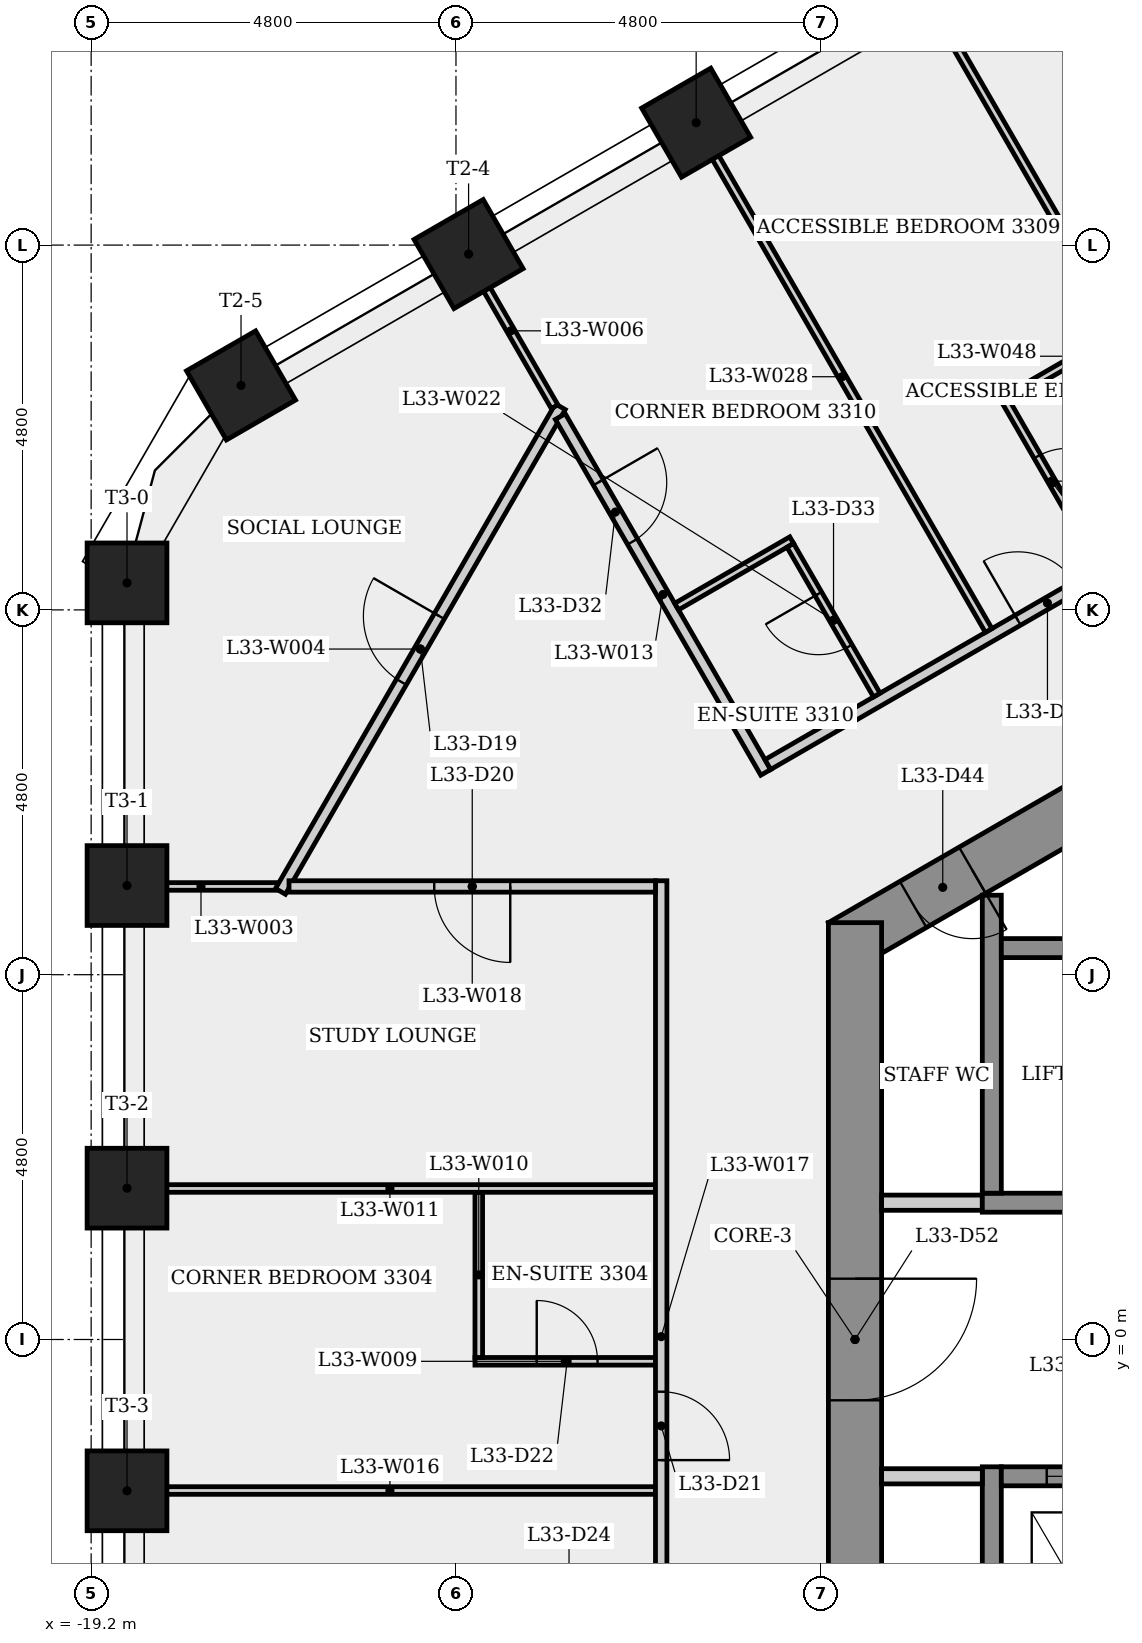
"""IFC4 building model, lengths in metres.
Left out: names, types, materials, properties, quantities, classifications, styles, units other than length and angle.
Written with IfcOpenShell. Run it as: python <this file> out.ifc"""

import sys

from ifc_helpers import new_model, si_unit, direction, frame, frame_2d, origin, origin_2d, place, context, subcontext, project, spatial, rectangle, extrude, element, fill, save


model = new_model("IFC4")
c1 = context("Model", 3, precision=1e-05, world=origin(), true_north=direction((0.0, 1.0)))
c2 = subcontext(c1, "Body", "Model", "MODEL_VIEW")
j1 = project(units=[si_unit("LENGTHUNIT", "METRE"), si_unit("PLANEANGLEUNIT", "RADIAN")], contexts=[c1])
p1 = place(None, origin())
s1 = spatial("IfcSite", under=j1, at=p1, CompositionType="ELEMENT")
p2 = place(p1, origin())
s2 = spatial("IfcBuilding", under=s1, at=p2, CompositionType="ELEMENT")
p3 = place(p2, frame((0.0, 0.0, 124.5)))
s3 = spatial("IfcBuildingStorey", under=s2, at=p3, CompositionType="ELEMENT", Elevation=124.5)
p4 = place(p3, frame((0.175, 10.667, 0.0), z_axis=(0.0, 0.0, 1.0), x_axis=(-0.866023993627, -0.500002442456, 0.0)))
e1 = element("IfcWall", 1, at=p4, inside=s3, PredefinedType="SHEAR", context=c2, shape_type="SweptSolid", body=[
    extrude(rectangle(XDim=10.97, YDim=0.7, at=frame_2d((5.485, 0.0))), origin(), (0.0, 0.0, 1.0), 4.0),
])
p5 = place(p4, frame((8.985, 0.0, 0.0)))
e2 = element("IfcOpeningElement", 2, at=p5, cuts=e1, PredefinedType="OPENING", context=c2, shape_type="SweptSolid", body=[
    extrude(rectangle(XDim=0.9, YDim=2.1, at=frame_2d((0.45, 1.05))), frame((0.0, 0.36, 0.0), z_axis=(0.0, -1.0, 0.0), x_axis=(1.0, 0.0, 0.0)), (0.0, 0.0, 1.0), 0.72),
])
p6 = place(p4, frame((2.495, 0.0, 0.0)))
e3 = element("IfcOpeningElement", 3, at=p6, cuts=e1, PredefinedType="OPENING", context=c2, shape_type="SweptSolid", body=[
    extrude(rectangle(XDim=0.9, YDim=2.1, at=frame_2d((0.45, 1.05))), frame((0.0, 0.36, 0.0), z_axis=(0.0, -1.0, 0.0), x_axis=(1.0, 0.0, 0.0)), (0.0, 0.0, 1.0), 0.72),
])
p7 = place(p3, frame((-9.15, 5.485, 0.0), z_axis=(0.0, 0.0, 1.0), x_axis=(0.0, -1.0, 0.0)))
e4 = element("IfcWall", 4, at=p7, inside=s3, PredefinedType="SHEAR", context=c2, shape_type="SweptSolid", body=[
    extrude(rectangle(XDim=10.97, YDim=0.7, at=frame_2d((5.485, 0.0))), origin(), (0.0, 0.0, 1.0), 4.0),
])
p8 = place(p7, frame((4.685, 0.0, 0.0)))
e5 = element("IfcOpeningElement", 5, at=p8, cuts=e4, PredefinedType="OPENING", context=c2, shape_type="SweptSolid", body=[
    extrude(rectangle(XDim=1.6, YDim=2.1, at=frame_2d((0.8, 1.05))), frame((0.0, 0.36, 0.0), z_axis=(0.0, -1.0, 0.0), x_axis=(1.0, 0.0, 0.0)), (0.0, 0.0, 1.0), 0.72),
])
for number, where, z_axis, x_axis in (
    (6, (-11.24, 16.011, 0.0), (0.0, 0.0, 1.0), (-0.5, 0.866, 0.0)),
    (7, (-14.234, 14.282, 0.0), (0.0, 0.0, 1.0), (-0.5, 0.866, 0.0)),
    (8, (-17.228, 12.553, 0.0), (0.0, 0.0, 1.0), (-0.5, 0.866, 0.0)),
    (9, (-18.728, 9.955, 0.0), (0.0, 0.0, 1.0), (-1.0, 0.0, 0.0)),
    (10, (-18.728, 5.973, 0.0), (0.0, 0.0, 1.0), (-1.0, 0.0, 0.0)),
    (11, (-18.728, 1.991, 0.0), (0.0, 0.0, 1.0), (-1.0, 0.0, 0.0)),
    (12, (-18.728, -1.991, 0.0), (0.0, 0.0, 1.0), (-1.0, 0.0, 0.0)),
):
    element("IfcColumn", number, at=place(p3, frame(where, z_axis=z_axis, x_axis=x_axis)), inside=s3, PredefinedType="COLUMN", context=c2, shape_type="SweptSolid", body=[
        extrude(rectangle(XDim=1.05, YDim=1.05, at=origin_2d()), origin(), (0.0, 0.0, 1.0), 4.0),
    ])
p9 = place(p3, frame((-16.747, 5.961, 0.0), z_axis=(0.0, 0.0, 1.0), x_axis=(-1.0, 0.0, 0.0)))
e13 = element("IfcWall", 13, at=p9, inside=s3, PredefinedType="PARTITIONING", context=c2, shape_type="SweptSolid", body=[
    extrude(rectangle(XDim=2.016, YDim=0.1, at=frame_2d((1.008, 0.0))), origin(), (0.0, 0.0, 1.0), 3.6),
])
p10 = place(p3, frame((-16.709, 5.896, 0.0), z_axis=(0.0, 0.0, 1.0), x_axis=(0.500011344903, 0.866018853703, 0.0)))
e14 = element("IfcWall", 14, at=p10, inside=s3, PredefinedType="PARTITIONING", context=c2, shape_type="SweptSolid", body=[
    extrude(rectangle(XDim=7.364, YDim=0.15, at=frame_2d((3.682, 0.0))), origin(), (0.0, 0.0, 1.0), 3.6),
])
p11 = place(p10, frame((3.182, 0.0, 0.0)))
e15 = element("IfcOpeningElement", 15, at=p11, cuts=e14, PredefinedType="OPENING", context=c2, shape_type="SweptSolid", body=[
    extrude(rectangle(XDim=1.0, YDim=2.1, at=frame_2d((0.5, 1.05))), frame((0.0, 0.085, 0.0), z_axis=(0.0, -1.0, 0.0), x_axis=(1.0, 0.0, 0.0)), (0.0, 0.0, 1.0), 0.17),
])
p12 = place(p3, frame((-14.255, 14.27, 0.0), z_axis=(0.0, 0.0, 1.0), x_axis=(0.499954687168, -0.86605156358, 0.0)))
e16 = element("IfcWall", 16, at=p12, inside=s3, PredefinedType="PARTITIONING", context=c2, shape_type="SweptSolid", body=[
    extrude(rectangle(XDim=2.305, YDim=0.1, at=frame_2d((1.153, 0.0))), origin(), (0.0, 0.0, 1.0), 3.6),
])
p13 = place(p3, frame((-14.15, -0.287, 0.0), z_axis=(0.0, 0.0, 1.0), x_axis=(1.0, 0.0, 0.0)))
e17 = element("IfcWall", 17, at=p13, inside=s3, PredefinedType="PARTITIONING", context=c2, shape_type="SweptSolid", body=[
    extrude(rectangle(XDim=2.375, YDim=0.1, at=frame_2d((1.188, 0.0))), origin(), (0.0, 0.0, 1.0), 3.6),
])
p14 = place(p13, frame((0.812, 0.0, 0.0)))
e18 = element("IfcOpeningElement", 18, at=p14, cuts=e17, PredefinedType="OPENING", context=c2, shape_type="SweptSolid", body=[
    extrude(rectangle(XDim=0.8, YDim=2.1, at=frame_2d((0.4, 1.05))), frame((0.0, 0.06, 0.0), z_axis=(0.0, -1.0, 0.0), x_axis=(1.0, 0.0, 0.0)), (0.0, 0.0, 1.0), 0.12),
])
p15 = place(p3, frame((-14.1, 1.937, 0.0), z_axis=(0.0, 0.0, 1.0), x_axis=(0.0, -1.0, 0.0)))
e19 = element("IfcWall", 19, at=p15, inside=s3, PredefinedType="PARTITIONING", context=c2, shape_type="SweptSolid", body=[
    extrude(rectangle(XDim=2.174, YDim=0.1, at=frame_2d((1.087, 0.0))), origin(), (0.0, 0.0, 1.0), 3.6),
])
p16 = place(p3, frame((-18.763, 1.987, 0.0), z_axis=(0.0, 0.0, 1.0), x_axis=(1.0, 0.0, 0.0)))
e20 = element("IfcWall", 20, at=p16, inside=s3, PredefinedType="PARTITIONING", context=c2, shape_type="SweptSolid", body=[
    extrude(rectangle(XDim=6.988, YDim=0.1, at=frame_2d((3.494, 0.0))), origin(), (0.0, 0.0, 1.0), 3.6),
])
p17 = place(p3, frame((-13.027, 12.144, 0.0), z_axis=(0.0, 0.0, 1.0), x_axis=(0.499962259756, -0.866047192028, 0.0)))
e21 = element("IfcWall", 21, at=p17, inside=s3, PredefinedType="PARTITIONING", context=c2, shape_type="SweptSolid", body=[
    extrude(rectangle(XDim=5.405, YDim=0.15, at=frame_2d((2.703, 0.0))), origin(), (0.0, 0.0, 1.0), 3.6),
])
p18 = place(p17, frame((1.0, 0.0, 0.0)))
e22 = element("IfcOpeningElement", 22, at=p18, cuts=e21, PredefinedType="OPENING", context=c2, shape_type="SweptSolid", body=[
    extrude(rectangle(XDim=0.9, YDim=2.1, at=frame_2d((0.45, 1.05))), frame((0.0, 0.085, 0.0), z_axis=(0.0, -1.0, 0.0), x_axis=(1.0, 0.0, 0.0)), (0.0, 0.0, 1.0), 0.17),
])
p19 = place(p3, frame((-11.775, -1.987, 0.0), z_axis=(0.0, 0.0, 1.0), x_axis=(-1.0, 0.0, 0.0)))
e23 = element("IfcWall", 23, at=p19, inside=s3, PredefinedType="PARTITIONING", context=c2, shape_type="SweptSolid", body=[
    extrude(rectangle(XDim=6.988, YDim=0.1, at=frame_2d((3.494, 0.0))), origin(), (0.0, 0.0, 1.0), 3.6),
])
p20 = place(p3, frame((-11.7, 6.036, 0.0), z_axis=(0.0, 0.0, 1.0), x_axis=(0.0, -1.0, 0.0)))
e24 = element("IfcWall", 24, at=p20, inside=s3, PredefinedType="PARTITIONING", context=c2, shape_type="SweptSolid", body=[
    extrude(rectangle(XDim=11.997, YDim=0.15, at=frame_2d((5.999, 0.0))), origin(), (0.0, 0.0, 1.0), 3.6),
])
p21 = place(p20, frame((6.723, 0.0, 0.0)))
e25 = element("IfcOpeningElement", 25, at=p21, cuts=e24, PredefinedType="OPENING", context=c2, shape_type="SweptSolid", body=[
    extrude(rectangle(XDim=0.9, YDim=2.1, at=frame_2d((0.45, 1.05))), frame((0.0, 0.085, 0.0), z_axis=(0.0, -1.0, 0.0), x_axis=(1.0, 0.0, 0.0)), (0.0, 0.0, 1.0), 0.17),
])
p22 = place(p3, frame((-11.775, 5.961, 0.0), z_axis=(0.0, 0.0, 1.0), x_axis=(-1.0, 0.0, 0.0)))
e26 = element("IfcWall", 26, at=p22, inside=s3, PredefinedType="PARTITIONING", context=c2, shape_type="SweptSolid", body=[
    extrude(rectangle(XDim=4.822, YDim=0.15, at=frame_2d((2.411, 0.0))), origin(), (0.0, 0.0, 1.0), 3.6),
])
p23 = place(p22, frame((1.911, 0.0, 0.0)))
e27 = element("IfcOpeningElement", 27, at=p23, cuts=e26, PredefinedType="OPENING", context=c2, shape_type="SweptSolid", body=[
    extrude(rectangle(XDim=1.0, YDim=2.1, at=frame_2d((0.5, 1.05))), frame((0.0, 0.085, 0.0), z_axis=(0.0, -1.0, 0.0), x_axis=(1.0, 0.0, 0.0)), (0.0, 0.0, 1.0), 0.17),
])
p24 = place(p3, frame((-10.297, 7.565, 0.0), z_axis=(0.0, 0.0, 1.0), x_axis=(0.866021325373, 0.50000706395, 0.0)))
e28 = element("IfcWall", 28, at=p24, inside=s3, PredefinedType="PARTITIONING", context=c2, shape_type="SweptSolid", body=[
    extrude(rectangle(XDim=10.42, YDim=0.15, at=frame_2d((5.21, 0.0))), origin(), (0.0, 0.0, 1.0), 3.6),
])
p25 = place(p24, frame((3.798, 0.0, 0.0)))
e29 = element("IfcOpeningElement", 29, at=p25, cuts=e28, PredefinedType="OPENING", context=c2, shape_type="SweptSolid", body=[
    extrude(rectangle(XDim=0.9, YDim=2.1, at=frame_2d((0.45, 1.05))), frame((0.0, 0.085, 0.0), z_axis=(0.0, -1.0, 0.0), x_axis=(1.0, 0.0, 0.0)), (0.0, 0.0, 1.0), 0.17),
])
p26 = place(p3, frame((-9.983, 10.518, 0.0), z_axis=(0.0, 0.0, 1.0), x_axis=(-0.866008858732, -0.500028655776, 0.0)))
e30 = element("IfcWall", 30, at=p26, inside=s3, PredefinedType="PARTITIONING", context=c2, shape_type="SweptSolid", body=[
    extrude(rectangle(XDim=1.749, YDim=0.1, at=frame_2d((0.874, 0.0))), origin(), (0.0, 0.0, 1.0), 3.6),
])
p27 = place(p3, frame((-8.864, 8.479, 0.0), z_axis=(0.0, 0.0, 1.0), x_axis=(-0.499982560684, 0.866035472144, 0.0)))
e31 = element("IfcWall", 31, at=p27, inside=s3, PredefinedType="PARTITIONING", context=c2, shape_type="SweptSolid", body=[
    extrude(rectangle(XDim=2.275, YDim=0.1, at=frame_2d((1.137, 0.0))), origin(), (0.0, 0.0, 1.0), 3.6),
])
p28 = place(p27, frame((0.738, 0.0, 0.0)))
e32 = element("IfcOpeningElement", 32, at=p28, cuts=e31, PredefinedType="OPENING", context=c2, shape_type="SweptSolid", body=[
    extrude(rectangle(XDim=0.8, YDim=2.1, at=frame_2d((0.4, 1.05))), frame((0.0, 0.06, 0.0), z_axis=(0.0, -1.0, 0.0), x_axis=(1.0, 0.0, 0.0)), (0.0, 0.0, 1.0), 0.12),
])
p29 = place(p3, frame((-8.8, 1.8, 0.0), z_axis=(0.0, 0.0, 1.0), x_axis=(1.0, 0.0, 0.0)))
e33 = element("IfcWall", 33, at=p29, inside=s3, PredefinedType="PARTITIONING", context=c2, shape_type="SweptSolid", body=[
    extrude(rectangle(XDim=1.325, YDim=0.2, at=frame_2d((0.663, 0.0))), origin(), (0.0, 0.0, 1.0), 3.6),
])
p30 = place(p3, frame((-7.392, 9.329, 0.0), z_axis=(0.0, 0.0, 1.0), x_axis=(-0.499997453958, 0.866026873738, 0.0)))
e34 = element("IfcWall", 34, at=p30, inside=s3, PredefinedType="PARTITIONING", context=c2, shape_type="SweptSolid", body=[
    extrude(rectangle(XDim=7.71, YDim=0.1, at=frame_2d((3.855, 0.0))), origin(), (0.0, 0.0, 1.0), 3.6),
])
p31 = place(p3, frame((-7.475, 1.8, 0.0), z_axis=(0.0, 0.0, 1.0), x_axis=(1.0, 0.0, 0.0)))
e35 = element("IfcWall", 35, at=p31, inside=s3, PredefinedType="SHEAR", context=c2, shape_type="SweptSolid", body=[
    extrude(rectangle(XDim=14.95, YDim=0.25, at=frame_2d((7.475, 0.0))), origin(), (0.0, 0.0, 1.0), 3.6),
])
p32 = place(p3, frame((-7.35, -5.846, 0.0), z_axis=(0.0, 0.0, 1.0), x_axis=(0.0, 1.0, 0.0)))
e36 = element("IfcWall", 36, at=p32, inside=s3, PredefinedType="SHEAR", context=c2, shape_type="SweptSolid", body=[
    extrude(rectangle(XDim=4.171, YDim=0.25, at=frame_2d((2.085, 0.0))), origin(), (0.0, 0.0, 1.0), 3.6),
])
p33 = place(p3, frame((-7.35, 1.925, 0.0), z_axis=(0.0, 0.0, 1.0), x_axis=(0.0, 1.0, 0.0)))
e37 = element("IfcWall", 37, at=p33, inside=s3, PredefinedType="SHEAR", context=c2, shape_type="SweptSolid", body=[
    extrude(rectangle(XDim=3.921, YDim=0.25, at=frame_2d((1.96, 0.0))), origin(), (0.0, 0.0, 1.0), 3.6),
])
p34 = place(p3, frame((-7.225, 5.15, 0.0), z_axis=(0.0, 0.0, 1.0), x_axis=(1.0, 0.0, 0.0)))
e38 = element("IfcWall", 38, at=p34, inside=s3, PredefinedType="SHEAR", context=c2, shape_type="SweptSolid", body=[
    extrude(rectangle(XDim=14.7, YDim=0.25, at=frame_2d((7.35, 0.0))), origin(), (0.0, 0.0, 1.0), 3.6),
])
p35 = place(p3, frame((-7.475, -1.8, 0.0), z_axis=(0.0, 0.0, 1.0), x_axis=(-1.0, 0.0, 0.0)))
e39 = element("IfcWall", 39, at=p35, inside=s3, PredefinedType="PARTITIONING", context=c2, shape_type="SweptSolid", body=[
    extrude(rectangle(XDim=1.325, YDim=0.2, at=frame_2d((0.663, 0.0))), origin(), (0.0, 0.0, 1.0), 3.6),
])
p36 = place(p3, frame((-7.207, 12.409, 0.0), z_axis=(0.0, 0.0, 1.0), x_axis=(0.500034319456, -0.866005588531, 0.0)))
e40 = element("IfcWall", 40, at=p36, inside=s3, PredefinedType="PARTITIONING", context=c2, shape_type="SweptSolid", body=[
    extrude(rectangle(XDim=2.575, YDim=0.1, at=frame_2d((1.288, 0.0))), origin(), (0.0, 0.0, 1.0), 3.6),
])
p37 = place(p36, frame((0.913, 0.0, 0.0)))
e41 = element("IfcOpeningElement", 41, at=p37, cuts=e40, PredefinedType="OPENING", context=c2, shape_type="SweptSolid", body=[
    extrude(rectangle(XDim=0.8, YDim=2.1, at=frame_2d((0.4, 1.05))), frame((0.0, 0.06, 0.0), z_axis=(0.0, -1.0, 0.0), x_axis=(1.0, 0.0, 0.0)), (0.0, 0.0, 1.0), 0.12),
])
p38 = place(p3, frame((-5.689, 13.228, 0.0), z_axis=(0.0, 0.0, 1.0), x_axis=(-0.866034955486, -0.499983455602, 0.0)))
e42 = element("IfcWall", 42, at=p38, inside=s3, PredefinedType="PARTITIONING", context=c2, shape_type="SweptSolid", body=[
    extrude(rectangle(XDim=1.673, YDim=0.1, at=frame_2d((0.837, 0.0))), origin(), (0.0, 0.0, 1.0), 3.6),
])
p39 = place(p3, frame((-8.239, 17.743, 0.0), z_axis=(0.0, 0.0, 1.0), x_axis=(0.499997453958, -0.866026873738, 0.0)))
e43 = element("IfcWall", 43, at=p39, inside=s3, PredefinedType="PARTITIONING", context=c2, shape_type="SweptSolid", body=[
    extrude(rectangle(XDim=7.71, YDim=0.1, at=frame_2d((3.855, 0.0))), origin(), (0.0, 0.0, 1.0), 3.6),
])
p40 = place(p3, frame((-7.225, -1.8, 0.0), z_axis=(0.0, 0.0, 1.0), x_axis=(1.0, 0.0, 0.0)))
e44 = element("IfcWall", 44, at=p40, inside=s3, PredefinedType="SHEAR", context=c2, shape_type="SweptSolid", body=[
    extrude(rectangle(XDim=14.7, YDim=0.25, at=frame_2d((7.35, 0.0))), origin(), (0.0, 0.0, 1.0), 3.6),
])
p41 = place(p40, frame((0.597, 0.0, 0.0)))
e45 = element("IfcOpeningElement", 45, at=p41, cuts=e44, PredefinedType="OPENING", context=c2, shape_type="SweptSolid", body=[
    extrude(rectangle(XDim=1.1, YDim=2.1, at=frame_2d((0.55, 1.05))), frame((0.0, 0.135, 0.0), z_axis=(0.0, -1.0, 0.0), x_axis=(1.0, 0.0, 0.0)), (0.0, 0.0, 1.0), 0.27),
])
p42 = place(p40, frame((3.0, 0.0, 0.0)))
e46 = element("IfcOpeningElement", 46, at=p42, cuts=e44, PredefinedType="OPENING", context=c2, shape_type="SweptSolid", body=[
    extrude(rectangle(XDim=1.1, YDim=2.1, at=frame_2d((0.55, 1.05))), frame((0.0, 0.135, 0.0), z_axis=(0.0, -1.0, 0.0), x_axis=(1.0, 0.0, 0.0)), (0.0, 0.0, 1.0), 0.27),
])
p43 = place(p40, frame((5.45, 0.0, 0.0)))
e47 = element("IfcOpeningElement", 47, at=p43, cuts=e44, PredefinedType="OPENING", context=c2, shape_type="SweptSolid", body=[
    extrude(rectangle(XDim=1.1, YDim=2.1, at=frame_2d((0.55, 1.05))), frame((0.0, 0.135, 0.0), z_axis=(0.0, -1.0, 0.0), x_axis=(1.0, 0.0, 0.0)), (0.0, 0.0, 1.0), 0.27),
])
p44 = place(p40, frame((7.9, 0.0, 0.0)))
e48 = element("IfcOpeningElement", 48, at=p44, cuts=e44, PredefinedType="OPENING", context=c2, shape_type="SweptSolid", body=[
    extrude(rectangle(XDim=1.1, YDim=2.1, at=frame_2d((0.55, 1.05))), frame((0.0, 0.135, 0.0), z_axis=(0.0, -1.0, 0.0), x_axis=(1.0, 0.0, 0.0)), (0.0, 0.0, 1.0), 0.27),
])
p45 = place(p40, frame((10.35, 0.0, 0.0)))
e49 = element("IfcOpeningElement", 49, at=p45, cuts=e44, PredefinedType="OPENING", context=c2, shape_type="SweptSolid", body=[
    extrude(rectangle(XDim=1.1, YDim=2.1, at=frame_2d((0.55, 1.05))), frame((0.0, 0.135, 0.0), z_axis=(0.0, -1.0, 0.0), x_axis=(1.0, 0.0, 0.0)), (0.0, 0.0, 1.0), 0.27),
])
p46 = place(p41, origin())
e50 = element("IfcDoor", 50, at=p46, inside=s3, OperationType="SLIDING_TO_LEFT", PredefinedType="DOOR", context=c2, shape_type="SweptSolid", body=[
    extrude(rectangle(XDim=1.1, YDim=2.1, at=frame_2d((0.55, 1.05))), frame((0.0, 0.025, 0.0), z_axis=(0.0, -1.0, 0.0), x_axis=(1.0, 0.0, 0.0)), (0.0, 0.0, 1.0), 0.05),
])
fill(e45, e50)
p47 = place(p11, origin())
e51 = element("IfcDoor", 51, at=p47, inside=s3, OperationType="SINGLE_SWING_RIGHT", PredefinedType="DOOR", context=c2, shape_type="SweptSolid", body=[
    extrude(rectangle(XDim=1.0, YDim=2.1, at=frame_2d((0.5, 1.05))), frame((0.0, 0.025, 0.0), z_axis=(0.0, -1.0, 0.0), x_axis=(1.0, 0.0, 0.0)), (0.0, 0.0, 1.0), 0.05),
])
fill(e15, e51)
p48 = place(p23, origin())
e52 = element("IfcDoor", 52, at=p48, inside=s3, OperationType="SINGLE_SWING_LEFT", PredefinedType="DOOR", context=c2, shape_type="SweptSolid", body=[
    extrude(rectangle(XDim=1.0, YDim=2.1, at=frame_2d((0.5, 1.05))), frame((0.0, 0.025, 0.0), z_axis=(0.0, -1.0, 0.0), x_axis=(1.0, 0.0, 0.0)), (0.0, 0.0, 1.0), 0.05),
])
fill(e27, e52)
p49 = place(p21, origin())
e53 = element("IfcDoor", 53, at=p49, inside=s3, OperationType="SINGLE_SWING_RIGHT", PredefinedType="DOOR", context=c2, shape_type="SweptSolid", body=[
    extrude(rectangle(XDim=0.9, YDim=2.1, at=frame_2d((0.45, 1.05))), frame((0.0, 0.025, 0.0), z_axis=(0.0, -1.0, 0.0), x_axis=(1.0, 0.0, 0.0)), (0.0, 0.0, 1.0), 0.05),
])
fill(e25, e53)
p50 = place(p14, origin())
e54 = element("IfcDoor", 54, at=p50, inside=s3, OperationType="SINGLE_SWING_LEFT", PredefinedType="DOOR", context=c2, shape_type="SweptSolid", body=[
    extrude(rectangle(XDim=0.8, YDim=2.1, at=frame_2d((0.4, 1.05))), frame((0.0, 0.025, 0.0), z_axis=(0.0, -1.0, 0.0), x_axis=(1.0, 0.0, 0.0)), (0.0, 0.0, 1.0), 0.05),
])
fill(e18, e54)
p51 = place(p25, origin())
e55 = element("IfcDoor", 55, at=p51, inside=s3, OperationType="SINGLE_SWING_LEFT", PredefinedType="DOOR", context=c2, shape_type="SweptSolid", body=[
    extrude(rectangle(XDim=0.9, YDim=2.1, at=frame_2d((0.45, 1.05))), frame((0.0, 0.025, 0.0), z_axis=(0.0, -1.0, 0.0), x_axis=(1.0, 0.0, 0.0)), (0.0, 0.0, 1.0), 0.05),
])
fill(e29, e55)
p52 = place(p37, origin())
e56 = element("IfcDoor", 56, at=p52, inside=s3, OperationType="SINGLE_SWING_RIGHT", PredefinedType="DOOR", context=c2, shape_type="SweptSolid", body=[
    extrude(rectangle(XDim=0.8, YDim=2.1, at=frame_2d((0.4, 1.05))), frame((0.0, 0.025, 0.0), z_axis=(0.0, -1.0, 0.0), x_axis=(1.0, 0.0, 0.0)), (0.0, 0.0, 1.0), 0.05),
])
fill(e41, e56)
p53 = place(p18, origin())
e57 = element("IfcDoor", 57, at=p53, inside=s3, OperationType="SINGLE_SWING_LEFT", PredefinedType="DOOR", context=c2, shape_type="SweptSolid", body=[
    extrude(rectangle(XDim=0.9, YDim=2.1, at=frame_2d((0.45, 1.05))), frame((0.0, 0.025, 0.0), z_axis=(0.0, -1.0, 0.0), x_axis=(1.0, 0.0, 0.0)), (0.0, 0.0, 1.0), 0.05),
])
fill(e22, e57)
p54 = place(p28, origin())
e58 = element("IfcDoor", 58, at=p54, inside=s3, OperationType="SINGLE_SWING_RIGHT", PredefinedType="DOOR", context=c2, shape_type="SweptSolid", body=[
    extrude(rectangle(XDim=0.8, YDim=2.1, at=frame_2d((0.4, 1.05))), frame((0.0, 0.025, 0.0), z_axis=(0.0, -1.0, 0.0), x_axis=(1.0, 0.0, 0.0)), (0.0, 0.0, 1.0), 0.05),
])
fill(e32, e58)
p55 = place(p5, origin())
e59 = element("IfcDoor", 59, at=p55, inside=s3, OperationType="SINGLE_SWING_LEFT", PredefinedType="DOOR", context=c2, shape_type="SweptSolid", body=[
    extrude(rectangle(XDim=0.9, YDim=2.1, at=frame_2d((0.45, 1.05))), frame((0.0, 0.025, 0.0), z_axis=(0.0, -1.0, 0.0), x_axis=(1.0, 0.0, 0.0)), (0.0, 0.0, 1.0), 0.05),
])
fill(e2, e59)
p56 = place(p8, origin())
e60 = element("IfcDoor", 60, at=p56, inside=s3, OperationType="SINGLE_SWING_LEFT", PredefinedType="DOOR", context=c2, shape_type="SweptSolid", body=[
    extrude(rectangle(XDim=1.6, YDim=2.1, at=frame_2d((0.8, 1.05))), frame((0.0, 0.025, 0.0), z_axis=(0.0, -1.0, 0.0), x_axis=(1.0, 0.0, 0.0)), (0.0, 0.0, 1.0), 0.05),
])
fill(e5, e60)
save(model, sys.argv[1])
